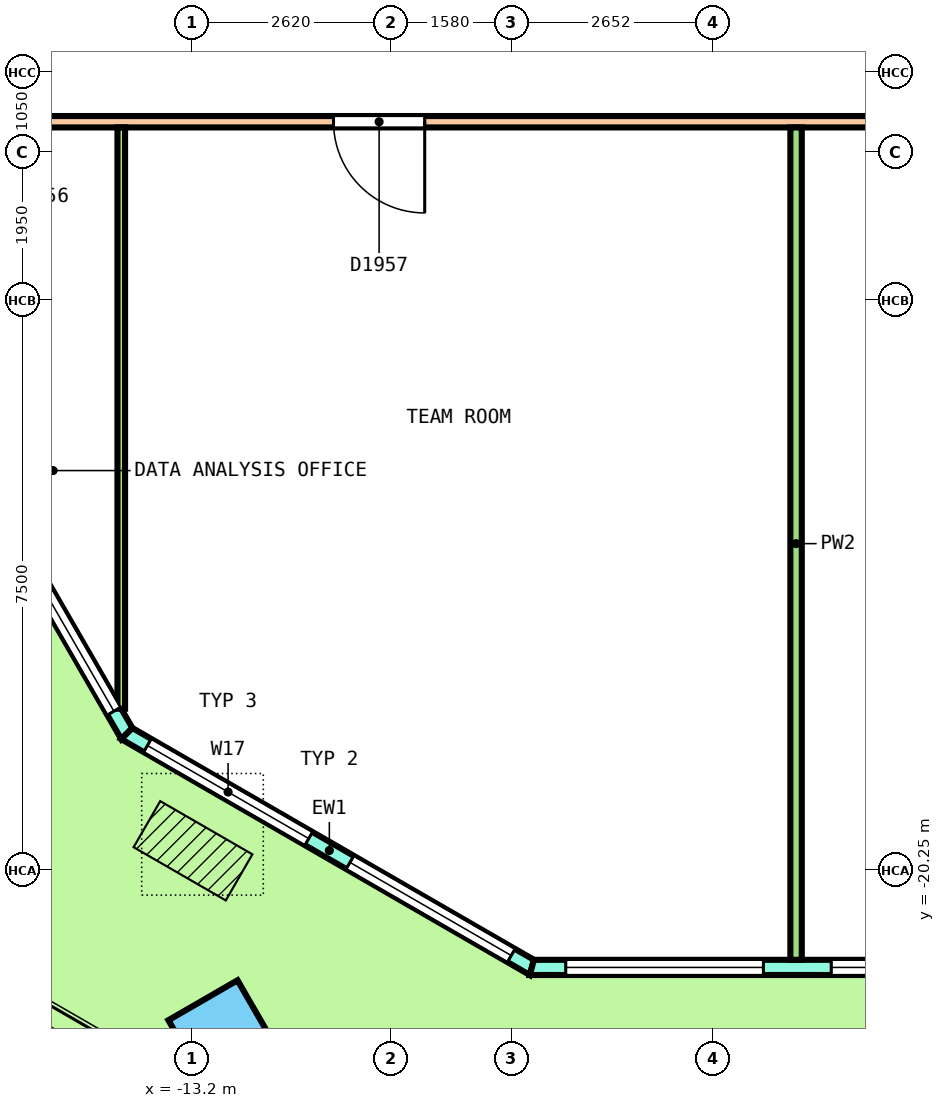
"""IFC4 building model, lengths in metres.
Left out: names, types, materials, properties, quantities, classifications, styles, units other than length and angle.
Written with IfcOpenShell. Run it as: python <this file> out.ifc"""

import sys

from ifc_helpers import new_model, si_unit, direction, frame, frame_2d, origin, origin_2d, place, context, subcontext, project, spatial, polyline, rectangle, outline, extrude, element, fill, save


model = new_model("IFC4")
c1 = context("Model", 3, precision=1e-05, world=origin(), true_north=direction((0.0, 1.0)))
c2 = subcontext(c1, "Body", "Model", "MODEL_VIEW")
j1 = project(units=[si_unit("LENGTHUNIT", "METRE"), si_unit("PLANEANGLEUNIT", "RADIAN")], contexts=[c1])
p1 = place(None, origin())
s1 = spatial("IfcSite", under=j1, at=p1, CompositionType="ELEMENT")
p2 = place(p1, origin())
s2 = spatial("IfcBuilding", under=s1, at=p2, CompositionType="ELEMENT")
p3 = place(p2, frame((0.0, 0.0, 215.4)))
s3 = spatial("IfcBuildingStorey", under=s2, at=p3, CompositionType="ELEMENT", Elevation=215.4)
p4 = place(p3, frame((-12.795, -22.412, 0.0), z_axis=(0.018113955825, -0.03141534774, 0.999342263957), x_axis=(0.86551973078, -0.499889444942, -0.031402841694)))
e1 = element("IfcColumn", 1, at=p4, inside=s3, PredefinedType="COLUMN", context=c2, shape_type="SweptSolid", body=[
    extrude(rectangle(XDim=1.05, YDim=1.05, at=origin_2d()), origin(), (0.0, 0.0, 1.0), 3.653),
])
p5 = place(p3, frame((-23.007, -2.951, 0.0), z_axis=(0.0, 0.0, 1.0), x_axis=(0.500006652623, -0.866021562857, 0.0)))
e2 = element("IfcWall", 2, at=p5, inside=s3, PredefinedType="SOLIDWALL", context=c2, shape_type="SweptSolid", body=[
    extrude(outline(polyline([(-0.027, -0.1), (1.029, -0.1), (2.085, -0.1), (3.141, -0.1), (4.197, -0.1), (5.252, -0.1), (6.308, -0.1), (7.364, -0.1), (8.42, -0.1), (9.476, -0.1), (10.532, -0.1), (11.588, -0.1), (12.644, -0.1), (13.699, -0.1), (14.755, -0.1), (15.811, -0.1), (16.867, -0.1), (17.923, -0.1), (17.869, 0.1), (16.82, 0.1), (15.77, 0.1), (14.721, 0.1), (13.671, 0.1), (12.622, 0.1), (11.572, 0.1), (10.522, 0.1), (9.473, 0.1), (8.423, 0.1), (7.374, 0.1), (6.324, 0.1), (5.275, 0.1), (4.225, 0.1), (3.176, 0.1), (2.126, 0.1), (1.076, 0.1), (0.027, 0.1), (-0.027, -0.1)])), origin(), (0.0, 0.0, 1.0), 3.7),
])
p6 = place(p5, frame((0.34, 0.0, 0.1)))
e3 = element("IfcOpeningElement", 3, at=p6, cuts=e2, PredefinedType="OPENING", context=c2, shape_type="SweptSolid", body=[
    extrude(rectangle(XDim=2.9, YDim=2.65, at=frame_2d((1.45, 1.325))), frame((0.0, 0.11, 0.0), z_axis=(0.0, -1.0, 0.0), x_axis=(1.0, 0.0, 0.0)), (0.0, 0.0, 1.0), 0.22),
])
p7 = place(p5, frame((3.919, 0.0, 0.1)))
e4 = element("IfcOpeningElement", 4, at=p7, cuts=e2, PredefinedType="OPENING", context=c2, shape_type="SweptSolid", body=[
    extrude(rectangle(XDim=2.9, YDim=2.65, at=frame_2d((1.45, 1.325))), frame((0.0, 0.11, 0.0), z_axis=(0.0, -1.0, 0.0), x_axis=(1.0, 0.0, 0.0)), (0.0, 0.0, 1.0), 0.22),
])
p8 = place(p5, frame((8.048, 0.0, 0.0)))
e5 = element("IfcOpeningElement", 5, at=p8, cuts=e2, PredefinedType="OPENING", context=c2, shape_type="SweptSolid", body=[
    extrude(rectangle(XDim=1.8, YDim=2.4, at=frame_2d((0.9, 1.2))), frame((0.0, 0.11, 0.0), z_axis=(0.0, -1.0, 0.0), x_axis=(1.0, 0.0, 0.0)), (0.0, 0.0, 1.0), 0.22),
])
p9 = place(p5, frame((8.048, 0.0, 2.55)))
e6 = element("IfcOpeningElement", 6, at=p9, cuts=e2, PredefinedType="OPENING", context=c2, shape_type="SweptSolid", body=[
    extrude(rectangle(XDim=1.8, YDim=0.2, at=frame_2d((0.9, 0.1))), frame((0.0, 0.11, 0.0), z_axis=(0.0, -1.0, 0.0), x_axis=(1.0, 0.0, 0.0)), (0.0, 0.0, 1.0), 0.22),
])
p10 = place(p5, frame((11.077, 0.0, 0.1)))
e7 = element("IfcOpeningElement", 7, at=p10, cuts=e2, PredefinedType="OPENING", context=c2, shape_type="SweptSolid", body=[
    extrude(rectangle(XDim=2.9, YDim=2.65, at=frame_2d((1.45, 1.325))), frame((0.0, 0.11, 0.0), z_axis=(0.0, -1.0, 0.0), x_axis=(1.0, 0.0, 0.0)), (0.0, 0.0, 1.0), 0.22),
])
p11 = place(p5, frame((14.656, 0.0, 0.1)))
e8 = element("IfcOpeningElement", 8, at=p11, cuts=e2, PredefinedType="OPENING", context=c2, shape_type="SweptSolid", body=[
    extrude(rectangle(XDim=2.9, YDim=2.65, at=frame_2d((1.45, 1.325))), frame((0.0, 0.11, 0.0), z_axis=(0.0, -1.0, 0.0), x_axis=(1.0, 0.0, 0.0)), (0.0, 0.0, 1.0), 0.22),
])
p12 = place(p3, frame((-14.059, -18.449, 0.0), z_axis=(0.0, 0.0, 1.0), x_axis=(0.866029647142, -0.499992650217, 0.0)))
e9 = element("IfcWall", 9, at=p12, inside=s3, PredefinedType="SOLIDWALL", context=c2, shape_type="SweptSolid", body=[
    extrude(outline(polyline([(-0.027, -0.1), (1.008, -0.1), (2.042, -0.1), (3.076, -0.1), (4.111, -0.1), (5.145, -0.1), (6.18, -0.1), (6.126, 0.1), (5.109, 0.1), (4.093, 0.1), (3.076, 0.1), (2.06, 0.1), (1.043, 0.1), (0.027, 0.1), (-0.027, -0.1)])), origin(), (0.0, 0.0, 1.0), 3.7),
])
p13 = place(p12, frame((0.313, 0.0, 0.1)))
e10 = element("IfcOpeningElement", 10, at=p13, cuts=e9, PredefinedType="OPENING", context=c2, shape_type="SweptSolid", body=[
    extrude(rectangle(XDim=2.45, YDim=2.65, at=frame_2d((1.225, 1.325))), frame((0.0, 0.11, 0.0), z_axis=(0.0, -1.0, 0.0), x_axis=(1.0, 0.0, 0.0)), (0.0, 0.0, 1.0), 0.22),
])
p14 = place(p12, frame((3.39, 0.0, 0.1)))
e11 = element("IfcOpeningElement", 11, at=p14, cuts=e9, PredefinedType="OPENING", context=c2, shape_type="SweptSolid", body=[
    extrude(rectangle(XDim=2.45, YDim=2.65, at=frame_2d((1.225, 1.325))), frame((0.0, 0.11, 0.0), z_axis=(0.0, -1.0, 0.0), x_axis=(1.0, 0.0, 0.0)), (0.0, 0.0, 1.0), 0.22),
])
p15 = place(p3, frame((-8.73, -21.526, 0.0), z_axis=(0.0, 0.0, 1.0), x_axis=(1.0, 0.0, 0.0)))
e12 = element("IfcWall", 12, at=p15, inside=s3, PredefinedType="SOLIDWALL", context=c2, shape_type="SweptSolid", body=[
    extrude(outline(polyline([(-0.027, -0.1), (1.003, -0.1), (2.034, -0.1), (3.064, -0.1), (4.094, -0.1), (5.124, -0.1), (6.155, -0.1), (7.185, -0.1), (8.215, -0.1), (9.245, -0.1), (10.276, -0.1), (11.306, -0.1), (12.336, -0.1), (13.366, -0.1), (14.396, -0.1), (15.427, -0.1), (16.457, -0.1), (17.487, -0.1), (17.434, 0.1), (16.41, 0.1), (15.386, 0.1), (14.362, 0.1), (13.338, 0.1), (12.314, 0.1), (11.29, 0.1), (10.266, 0.1), (9.242, 0.1), (8.218, 0.1), (7.194, 0.1), (6.17, 0.1), (5.146, 0.1), (4.123, 0.1), (3.099, 0.1), (2.075, 0.1), (1.051, 0.1), (0.027, 0.1), (-0.027, -0.1)])), origin(), (0.0, 0.0, 1.0), 3.7),
])
p16 = place(p15, frame((0.446, 0.0, 0.1)))
e13 = element("IfcOpeningElement", 13, at=p16, cuts=e12, PredefinedType="OPENING", context=c2, shape_type="SweptSolid", body=[
    extrude(rectangle(XDim=2.6, YDim=2.65, at=frame_2d((1.3, 1.325))), frame((0.0, 0.11, 0.0), z_axis=(0.0, -1.0, 0.0), x_axis=(1.0, 0.0, 0.0)), (0.0, 0.0, 1.0), 0.22),
])
p17 = place(p15, frame((3.938, 0.0, 0.1)))
e14 = element("IfcOpeningElement", 14, at=p17, cuts=e12, PredefinedType="OPENING", context=c2, shape_type="SweptSolid", body=[
    extrude(rectangle(XDim=2.6, YDim=2.65, at=frame_2d((1.3, 1.325))), frame((0.0, 0.11, 0.0), z_axis=(0.0, -1.0, 0.0), x_axis=(1.0, 0.0, 0.0)), (0.0, 0.0, 1.0), 0.22),
])
p18 = place(p15, frame((7.83, 0.0, 0.0)))
e15 = element("IfcOpeningElement", 15, at=p18, cuts=e12, PredefinedType="OPENING", context=c2, shape_type="SweptSolid", body=[
    extrude(rectangle(XDim=1.8, YDim=2.4, at=frame_2d((0.9, 1.2))), frame((0.0, 0.11, 0.0), z_axis=(0.0, -1.0, 0.0), x_axis=(1.0, 0.0, 0.0)), (0.0, 0.0, 1.0), 0.22),
])
p19 = place(p15, frame((7.83, 0.0, 2.55)))
e16 = element("IfcOpeningElement", 16, at=p19, cuts=e12, PredefinedType="OPENING", context=c2, shape_type="SweptSolid", body=[
    extrude(rectangle(XDim=1.8, YDim=0.2, at=frame_2d((0.9, 0.1))), frame((0.0, 0.11, 0.0), z_axis=(0.0, -1.0, 0.0), x_axis=(1.0, 0.0, 0.0)), (0.0, 0.0, 1.0), 0.22),
])
p20 = place(p15, frame((10.923, 0.0, 0.1)))
e17 = element("IfcOpeningElement", 17, at=p20, cuts=e12, PredefinedType="OPENING", context=c2, shape_type="SweptSolid", body=[
    extrude(rectangle(XDim=2.6, YDim=2.65, at=frame_2d((1.3, 1.325))), frame((0.0, 0.11, 0.0), z_axis=(0.0, -1.0, 0.0), x_axis=(1.0, 0.0, 0.0)), (0.0, 0.0, 1.0), 0.22),
])
p21 = place(p15, frame((14.415, 0.0, 0.1)))
e18 = element("IfcOpeningElement", 18, at=p21, cuts=e12, PredefinedType="OPENING", context=c2, shape_type="SweptSolid", body=[
    extrude(rectangle(XDim=2.6, YDim=2.65, at=frame_2d((1.3, 1.325))), frame((0.0, 0.11, 0.0), z_axis=(0.0, -1.0, 0.0), x_axis=(1.0, 0.0, 0.0)), (0.0, 0.0, 1.0), 0.22),
])
p22 = place(p3, frame((-15.45, -10.4, 0.0), z_axis=(0.0, 0.0, 1.0), x_axis=(1.0, 0.0, 0.0)))
e19 = element("IfcWall", 19, at=p22, inside=s3, PredefinedType="PARTITIONING", context=c2, shape_type="SweptSolid", body=[
    extrude(rectangle(XDim=31.025, YDim=0.15, at=frame_2d((15.512, 0.0))), origin(), (0.0, 0.0, 1.0), 2.8),
])
p23 = place(p22, frame((4.11, 0.0, 0.0)))
e20 = element("IfcOpeningElement", 20, at=p23, cuts=e19, PredefinedType="OPENING", context=c2, shape_type="SweptSolid", body=[
    extrude(rectangle(XDim=1.2, YDim=2.1, at=frame_2d((0.6, 1.05))), frame((0.0, 0.085, 0.0), z_axis=(0.0, -1.0, 0.0), x_axis=(1.0, 0.0, 0.0)), (0.0, 0.0, 1.0), 0.17),
])
p24 = place(p22, frame((18.418, 0.0, 0.0)))
e21 = element("IfcOpeningElement", 21, at=p24, cuts=e19, PredefinedType="OPENING", context=c2, shape_type="SweptSolid", body=[
    extrude(rectangle(XDim=1.2, YDim=2.1, at=frame_2d((0.6, 1.05))), frame((0.0, 0.085, 0.0), z_axis=(0.0, -1.0, 0.0), x_axis=(1.0, 0.0, 0.0)), (0.0, 0.0, 1.0), 0.17),
])
p25 = place(p22, frame((26.816, 0.0, 0.0)))
e22 = element("IfcOpeningElement", 22, at=p25, cuts=e19, PredefinedType="OPENING", context=c2, shape_type="SweptSolid", body=[
    extrude(rectangle(XDim=1.2, YDim=2.1, at=frame_2d((0.6, 1.05))), frame((0.0, 0.085, 0.0), z_axis=(0.0, -1.0, 0.0), x_axis=(1.0, 0.0, 0.0)), (0.0, 0.0, 1.0), 0.17),
])
p26 = place(p3, frame((-5.254, -21.426, 0.0), z_axis=(0.0, 0.0, 1.0), x_axis=(0.0, 1.0, 0.0)))
e23 = element("IfcWall", 23, at=p26, inside=s3, PredefinedType="PARTITIONING", context=c2, shape_type="SweptSolid", body=[
    extrude(rectangle(XDim=10.951, YDim=0.15, at=frame_2d((5.475, 0.0))), origin(), (0.0, 0.0, 1.0), 2.8),
])
p27 = place(p3, frame((-14.132, -18.122, 0.0), z_axis=(0.0, 0.0, 1.0), x_axis=(0.0, 1.0, 0.0)))
e24 = element("IfcWall", 24, at=p27, inside=s3, PredefinedType="PARTITIONING", context=c2, shape_type="SweptSolid", body=[
    extrude(rectangle(XDim=7.647, YDim=0.1, at=frame_2d((3.824, 0.0))), origin(), (0.0, 0.0, 1.0), 2.8),
])
p28 = place(p11, origin())
e25 = element("IfcWindow", 25, at=p28, inside=s3, PartitioningType="SINGLE_PANEL", PredefinedType="WINDOW", context=c2, shape_type="SweptSolid", body=[
    extrude(rectangle(XDim=2.9, YDim=2.65, at=frame_2d((1.45, 1.325))), frame((0.0, 0.03, 0.0), z_axis=(0.0, -1.0, 0.0), x_axis=(1.0, 0.0, 0.0)), (0.0, 0.0, 1.0), 0.06),
])
fill(e8, e25)
p29 = place(p13, origin())
e26 = element("IfcWindow", 26, at=p29, inside=s3, PartitioningType="SINGLE_PANEL", PredefinedType="WINDOW", context=c2, shape_type="SweptSolid", body=[
    extrude(rectangle(XDim=2.45, YDim=2.65, at=frame_2d((1.225, 1.325))), frame((0.0, 0.03, 0.0), z_axis=(0.0, -1.0, 0.0), x_axis=(1.0, 0.0, 0.0)), (0.0, 0.0, 1.0), 0.06),
])
fill(e10, e26)
p30 = place(p14, origin())
e27 = element("IfcWindow", 27, at=p30, inside=s3, PartitioningType="SINGLE_PANEL", PredefinedType="WINDOW", context=c2, shape_type="SweptSolid", body=[
    extrude(rectangle(XDim=2.45, YDim=2.65, at=frame_2d((1.225, 1.325))), frame((0.0, 0.03, 0.0), z_axis=(0.0, -1.0, 0.0), x_axis=(1.0, 0.0, 0.0)), (0.0, 0.0, 1.0), 0.06),
])
fill(e11, e27)
p31 = place(p16, origin())
e28 = element("IfcWindow", 28, at=p31, inside=s3, PartitioningType="SINGLE_PANEL", PredefinedType="WINDOW", context=c2, shape_type="SweptSolid", body=[
    extrude(rectangle(XDim=2.6, YDim=2.65, at=frame_2d((1.3, 1.325))), frame((0.0, 0.03, 0.0), z_axis=(0.0, -1.0, 0.0), x_axis=(1.0, 0.0, 0.0)), (0.0, 0.0, 1.0), 0.06),
])
fill(e13, e28)
p32 = place(p17, origin())
e29 = element("IfcWindow", 29, at=p32, inside=s3, PartitioningType="SINGLE_PANEL", PredefinedType="WINDOW", context=c2, shape_type="SweptSolid", body=[
    extrude(rectangle(XDim=2.6, YDim=2.65, at=frame_2d((1.3, 1.325))), frame((0.0, 0.03, 0.0), z_axis=(0.0, -1.0, 0.0), x_axis=(1.0, 0.0, 0.0)), (0.0, 0.0, 1.0), 0.06),
])
fill(e14, e29)
p33 = place(p23, origin())
e30 = element("IfcDoor", 30, at=p33, inside=s3, OperationType="DOUBLE_DOOR_SINGLE_SWING", PredefinedType="DOOR", context=c2, shape_type="SweptSolid", body=[
    extrude(rectangle(XDim=1.2, YDim=2.1, at=frame_2d((0.6, 1.05))), frame((0.0, 0.025, 0.0), z_axis=(0.0, -1.0, 0.0), x_axis=(1.0, 0.0, 0.0)), (0.0, 0.0, 1.0), 0.05),
])
fill(e20, e30)
save(model, sys.argv[1])
